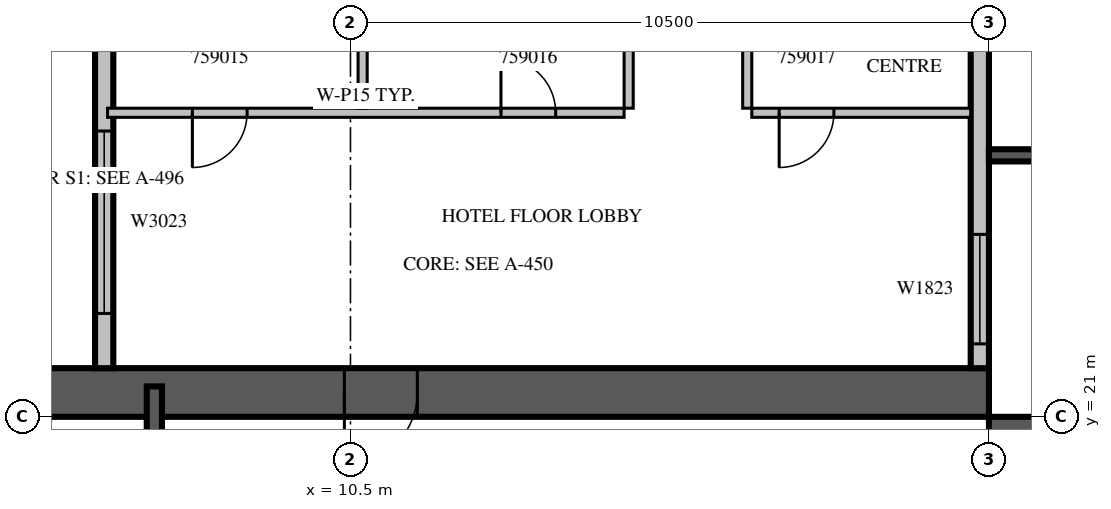
"""IFC4 building model, lengths in metres.
Left out: names, types, materials, properties, quantities, classifications, styles, units other than length and angle.
Written with IfcOpenShell. Run it as: python <this file> out.ifc"""

import sys

from ifc_helpers import new_model, si_unit, direction, frame, frame_2d, origin, place, context, subcontext, project, spatial, rectangle, extrude, source, transform, mapped, element, fill, save


model = new_model("IFC4")
c1 = context("Model", 3, precision=1e-05, world=origin(), true_north=direction((0.0, 1.0)))
c2 = subcontext(c1, "Body", "Model", "MODEL_VIEW")
j1 = project(units=[si_unit("LENGTHUNIT", "METRE"), si_unit("PLANEANGLEUNIT", "RADIAN")], contexts=[c1])
p1 = place(None, origin())
s1 = spatial("IfcSite", under=j1, at=p1, CompositionType="ELEMENT")
p2 = place(p1, origin())
s2 = spatial("IfcBuilding", under=s1, at=p2, CompositionType="ELEMENT")
p3 = place(p2, frame((0.0, 0.0, 257.6)))
s3 = spatial("IfcBuildingStorey", under=s2, at=p3, CompositionType="ELEMENT", Elevation=257.6)
m1 = source(origin(), c2, "Body", "SweptSolid", [
    extrude(rectangle(XDim=16.8, YDim=0.8, at=frame_2d((8.4, 0.0))), origin(), (0.0, 0.0, 1.0), 3.8),
])
p4 = place(p3, frame((21.4, 4.2, 0.0), z_axis=(0.0, 0.0, 1.0), x_axis=(0.0, 1.0, 0.0)))
e1 = element("IfcWall", 1, at=p4, inside=s3, PredefinedType="SHEAR", context=c2, shape_type="MappedRepresentation", body=[
    mapped(m1, transform((0.0, 0.0, 0.0), scale=1.0)),
])
m2 = source(origin(), c2, "Body", "SweptSolid", [
    extrude(rectangle(XDim=1.2, YDim=2.1, at=frame_2d((0.6, 1.05))), frame((0.0, 0.41, 0.0), z_axis=(0.0, -1.0, 0.0), x_axis=(1.0, 0.0, 0.0)), (0.0, 0.0, 1.0), 0.82),
])
p5 = place(p4, frame((14.7, 0.0, 0.0)))
e2 = element("IfcOpeningElement", 2, at=p5, cuts=e1, PredefinedType="OPENING", context=c2, shape_type="MappedRepresentation", body=[
    mapped(m2, transform((0.0, 0.0, 0.0), scale=1.0)),
])
p6 = place(p3, frame((4.2, 21.4, 0.0), z_axis=(0.0, 0.0, 1.0), x_axis=(1.0, 0.0, 0.0)))
e3 = element("IfcWall", 3, at=p6, inside=s3, PredefinedType="SHEAR", context=c2, shape_type="MappedRepresentation", body=[
    mapped(m1, transform((0.0, 0.0, 0.0), scale=1.0)),
])
p7 = place(p6, frame((6.2, 0.0, 0.0)))
e4 = element("IfcOpeningElement", 4, at=p7, cuts=e3, PredefinedType="OPENING", context=c2, shape_type="MappedRepresentation", body=[
    mapped(m2, transform((0.0, 0.0, 0.0), scale=1.0)),
])
m3 = source(origin(), c2, "Body", "SweptSolid", [
    extrude(rectangle(XDim=7.2, YDim=0.3, at=frame_2d((3.6, 0.0))), origin(), (0.0, 0.0, 1.0), 3.4),
])
p8 = place(p3, frame((20.85, 21.8, 0.0), z_axis=(0.0, 0.0, 1.0), x_axis=(0.0, 1.0, 0.0)))
e5 = element("IfcWall", 5, at=p8, inside=s3, PredefinedType="STANDARD", context=c2, shape_type="MappedRepresentation", body=[
    mapped(m3, transform((0.0, 0.0, 0.0), scale=1.0)),
])
m4 = source(origin(), c2, "Body", "SweptSolid", [
    extrude(rectangle(XDim=1.8, YDim=2.3, at=frame_2d((0.9, 1.15))), frame((0.0, 0.16, 0.0), z_axis=(0.0, -1.0, 0.0), x_axis=(1.0, 0.0, 0.0)), (0.0, 0.0, 1.0), 0.32),
])
p9 = place(p8, frame((0.4, 0.0, 0.6)))
e6 = element("IfcOpeningElement", 6, at=p9, cuts=e5, PredefinedType="OPENING", context=c2, shape_type="MappedRepresentation", body=[
    mapped(m4, transform((0.0, 0.0, 0.0), scale=1.0)),
])
m5 = source(origin(), c2, "Body", "SweptSolid", [
    extrude(rectangle(XDim=1.0, YDim=2.1, at=frame_2d((0.5, 1.05))), frame((0.0, 0.16, 0.0), z_axis=(0.0, -1.0, 0.0), x_axis=(1.0, 0.0, 0.0)), (0.0, 0.0, 1.0), 0.32),
])
p10 = place(p8, frame((5.292, 0.0, 0.0)))
e7 = element("IfcOpeningElement", 7, at=p10, cuts=e5, PredefinedType="OPENING", context=c2, shape_type="MappedRepresentation", body=[
    mapped(m5, transform((0.0, 0.0, 0.0), scale=1.0)),
])
m6 = source(origin(), c2, "Body", "SweptSolid", [
    extrude(rectangle(XDim=16.6, YDim=0.3, at=frame_2d((8.3, 0.0))), origin(), (0.0, 0.0, 1.0), 3.4),
])
p11 = place(p3, frame((6.45, 38.4, 0.0), z_axis=(0.0, 0.0, 1.0), x_axis=(0.0, -1.0, 0.0)))
e8 = element("IfcWall", 8, at=p11, inside=s3, PredefinedType="STANDARD", context=c2, shape_type="MappedRepresentation", body=[
    mapped(m6, transform((0.0, 0.0, 0.0), scale=1.0)),
])
p12 = place(p11, frame((1.15, 0.0, 0.6)))
e9 = element("IfcOpeningElement", 9, at=p12, cuts=e8, PredefinedType="OPENING", context=c2, shape_type="MappedRepresentation", body=[
    mapped(m4, transform((0.0, 0.0, 0.0), scale=1.0)),
])
p13 = place(p11, frame((9.438, 0.0, 0.6)))
e10 = element("IfcOpeningElement", 10, at=p13, cuts=e8, PredefinedType="OPENING", context=c2, shape_type="MappedRepresentation", body=[
    mapped(m4, transform((0.0, 0.0, 0.0), scale=1.0)),
])
m7 = source(origin(), c2, "Body", "SweptSolid", [
    extrude(rectangle(XDim=3.0, YDim=2.3, at=frame_2d((1.5, 1.15))), frame((0.0, 0.16, 0.0), z_axis=(0.0, -1.0, 0.0), x_axis=(1.0, 0.0, 0.0)), (0.0, 0.0, 1.0), 0.32),
])
p14 = place(p11, frame((12.7, 0.0, 0.6)))
e11 = element("IfcOpeningElement", 11, at=p14, cuts=e8, PredefinedType="OPENING", context=c2, shape_type="MappedRepresentation", body=[
    mapped(m7, transform((0.0, 0.0, 0.0), scale=1.0)),
])
p15 = place(p11, frame((5.45, 0.0, 0.0)))
e12 = element("IfcOpeningElement", 12, at=p15, cuts=e8, PredefinedType="OPENING", context=c2, shape_type="MappedRepresentation", body=[
    mapped(m5, transform((0.0, 0.0, 0.0), scale=1.0)),
])
m8 = source(origin(), c2, "Body", "SweptSolid", [
    extrude(rectangle(XDim=3.9, YDim=0.2, at=frame_2d((1.95, 0.0))), origin(), (0.0, 0.0, 1.0), 3.39),
])
p16 = place(p3, frame((21.0, 25.3, 0.0), z_axis=(0.0, 0.0, 1.0), x_axis=(1.0, 0.0, 0.0)))
e13 = element("IfcWall", 13, at=p16, inside=s3, PredefinedType="SOLIDWALL", context=c2, shape_type="MappedRepresentation", body=[
    mapped(m8, transform((0.0, 0.0, 0.0), scale=1.0)),
])
m9 = source(origin(), c2, "Body", "SweptSolid", [
    extrude(rectangle(XDim=2.4, YDim=2.3, at=frame_2d((1.2, 1.15))), frame((0.0, 0.11, 0.0), z_axis=(0.0, -1.0, 0.0), x_axis=(1.0, 0.0, 0.0)), (0.0, 0.0, 1.0), 0.22),
])
p17 = place(p16, frame((0.75, 0.0, 0.6)))
e14 = element("IfcOpeningElement", 14, at=p17, cuts=e13, PredefinedType="OPENING", context=c2, shape_type="MappedRepresentation", body=[
    mapped(m9, transform((0.0, 0.0, 0.0), scale=1.0)),
])
m10 = source(origin(), c2, "Body", "SweptSolid", [
    extrude(rectangle(XDim=6.6, YDim=0.25, at=frame_2d((3.3, 0.0))), origin(), (0.0, 0.0, 1.0), 3.4),
])
p18 = place(p3, frame((7.275, 14.9, 0.0), z_axis=(0.0, 0.0, 1.0), x_axis=(0.0, 1.0, 0.0)))
e15 = element("IfcWall", 15, at=p18, inside=s3, PredefinedType="SOLIDWALL", context=c2, shape_type="MappedRepresentation", body=[
    mapped(m10, transform((0.0, 0.0, 0.0), scale=1.0)),
])
m11 = source(origin(), c2, "Body", "SweptSolid", [
    extrude(rectangle(XDim=1.1, YDim=2.1, at=frame_2d((0.55, 1.05))), frame((0.0, 0.135, 0.0), z_axis=(0.0, -1.0, 0.0), x_axis=(1.0, 0.0, 0.0)), (0.0, 0.0, 1.0), 0.27),
])
p19 = place(p18, frame((0.15, 0.0, 0.0)))
e16 = element("IfcOpeningElement", 16, at=p19, cuts=e15, PredefinedType="OPENING", context=c2, shape_type="MappedRepresentation", body=[
    mapped(m11, transform((0.0, 0.0, 0.0), scale=1.0)),
])
m12 = source(origin(), c2, "Body", "SweptSolid", [
    extrude(rectangle(XDim=8.495, YDim=0.15, at=frame_2d((4.247, 0.0))), origin(), (0.0, 0.0, 1.0), 3.4),
])
p20 = place(p3, frame((6.505, 26.0, 0.0), z_axis=(0.0, 0.0, 1.0), x_axis=(1.0, 0.0, 0.0)))
e17 = element("IfcWall", 17, at=p20, inside=s3, PredefinedType="PARTITIONING", context=c2, shape_type="MappedRepresentation", body=[
    mapped(m12, transform((0.0, 0.0, 0.0), scale=1.0)),
])
m13 = source(origin(), c2, "Body", "SweptSolid", [
    extrude(rectangle(XDim=0.9, YDim=2.1, at=frame_2d((0.45, 1.05))), frame((0.0, 0.085, 0.0), z_axis=(0.0, -1.0, 0.0), x_axis=(1.0, 0.0, 0.0)), (0.0, 0.0, 1.0), 0.17),
])
p21 = place(p20, frame((1.395, 0.0, 0.0)))
e18 = element("IfcOpeningElement", 18, at=p21, cuts=e17, PredefinedType="OPENING", context=c2, shape_type="MappedRepresentation", body=[
    mapped(m13, transform((0.0, 0.0, 0.0), scale=1.0)),
])
p22 = place(p20, frame((6.47, 0.0, 0.0)))
e19 = element("IfcOpeningElement", 19, at=p22, cuts=e17, PredefinedType="OPENING", context=c2, shape_type="MappedRepresentation", body=[
    mapped(m13, transform((0.0, 0.0, 0.0), scale=1.0)),
])
m14 = source(origin(), c2, "Body", "SweptSolid", [
    extrude(rectangle(XDim=3.6, YDim=0.15, at=frame_2d((1.8, 0.0))), origin(), (0.0, 0.0, 1.0), 3.4),
])
p23 = place(p3, frame((17.1, 26.0, 0.0), z_axis=(0.0, 0.0, 1.0), x_axis=(1.0, 0.0, 0.0)))
e20 = element("IfcWall", 20, at=p23, inside=s3, PredefinedType="PARTITIONING", context=c2, shape_type="MappedRepresentation", body=[
    mapped(m14, transform((0.0, 0.0, 0.0), scale=1.0)),
])
p24 = place(p23, frame((0.45, 0.0, 0.0)))
e21 = element("IfcOpeningElement", 21, at=p24, cuts=e20, PredefinedType="OPENING", context=c2, shape_type="MappedRepresentation", body=[
    mapped(m13, transform((0.0, 0.0, 0.0), scale=1.0)),
])
p25 = place(p3, frame((10.7, 26.075, 0.0), z_axis=(0.0, 0.0, 1.0), x_axis=(0.0, 1.0, 0.0)))
e22 = element("IfcWall", 22, at=p25, inside=s3, PredefinedType="PARTITIONING", context=c2, shape_type="SweptSolid", body=[
    extrude(rectangle(XDim=2.926, YDim=0.15, at=frame_2d((1.463, 0.0))), origin(), (0.0, 0.0, 1.0), 3.4),
])
m15 = source(origin(), c2, "Body", "SweptSolid", [
    extrude(rectangle(XDim=3.25, YDim=0.15, at=frame_2d((1.625, 0.0))), origin(), (0.0, 0.0, 1.0), 3.4),
])
for number, where, z_axis, x_axis in (
    (23, (15.075, 26.075, 0.0), (0.0, 0.0, 1.0), (0.0, 1.0, 0.0)),
    (24, (17.025, 29.325, 0.0), (0.0, 0.0, 1.0), (0.0, -1.0, 0.0)),
):
    element("IfcWall", number, at=place(p3, frame(where, z_axis=z_axis, x_axis=x_axis)), inside=s3, PredefinedType="PARTITIONING", context=c2, shape_type="MappedRepresentation", body=[
        mapped(m15, transform((0.0, 0.0, 0.0), scale=1.0)),
    ])
m16 = source(origin(), c2, "Body", "SweptSolid", [
    extrude(rectangle(XDim=1.8, YDim=2.3, at=frame_2d((0.9, 1.15))), frame((0.0, 0.03, 0.0), z_axis=(0.0, -1.0, 0.0), x_axis=(1.0, 0.0, 0.0)), (0.0, 0.0, 1.0), 0.06),
])
p26 = place(p9, origin())
e25 = element("IfcWindow", 25, at=p26, inside=s3, PartitioningType="SINGLE_PANEL", PredefinedType="WINDOW", context=c2, shape_type="MappedRepresentation", body=[
    mapped(m16, transform((0.0, 0.0, 0.0), scale=1.0)),
])
fill(e6, e25)
m17 = source(origin(), c2, "Body", "SweptSolid", [
    extrude(rectangle(XDim=3.0, YDim=2.3, at=frame_2d((1.5, 1.15))), frame((0.0, 0.03, 0.0), z_axis=(0.0, -1.0, 0.0), x_axis=(1.0, 0.0, 0.0)), (0.0, 0.0, 1.0), 0.06),
])
p27 = place(p14, origin())
e26 = element("IfcWindow", 26, at=p27, inside=s3, PartitioningType="SINGLE_PANEL", PredefinedType="WINDOW", context=c2, shape_type="MappedRepresentation", body=[
    mapped(m17, transform((0.0, 0.0, 0.0), scale=1.0)),
])
fill(e11, e26)
m18 = source(origin(), c2, "Body", "SweptSolid", [
    extrude(rectangle(XDim=1.2, YDim=2.1, at=frame_2d((0.6, 1.05))), frame((0.0, 0.025, 0.0), z_axis=(0.0, -1.0, 0.0), x_axis=(1.0, 0.0, 0.0)), (0.0, 0.0, 1.0), 0.05),
])
p28 = place(p7, origin())
e27 = element("IfcDoor", 27, at=p28, inside=s3, OperationType="SINGLE_SWING_RIGHT", PredefinedType="DOOR", context=c2, shape_type="MappedRepresentation", body=[
    mapped(m18, transform((0.0, 0.0, 0.0), scale=1.0)),
])
fill(e4, e27)
m19 = source(origin(), c2, "Body", "SweptSolid", [
    extrude(rectangle(XDim=0.9, YDim=2.1, at=frame_2d((0.45, 1.05))), frame((0.0, 0.025, 0.0), z_axis=(0.0, -1.0, 0.0), x_axis=(1.0, 0.0, 0.0)), (0.0, 0.0, 1.0), 0.05),
])
p29 = place(p21, origin())
e28 = element("IfcDoor", 28, at=p29, inside=s3, OperationType="SINGLE_SWING_RIGHT", PredefinedType="DOOR", context=c2, shape_type="MappedRepresentation", body=[
    mapped(m19, transform((0.0, 0.0, 0.0), scale=1.0)),
])
fill(e18, e28)
p30 = place(p22, origin())
e29 = element("IfcDoor", 29, at=p30, inside=s3, OperationType="SINGLE_SWING_LEFT", PredefinedType="DOOR", context=c2, shape_type="MappedRepresentation", body=[
    mapped(m19, transform((0.0, 0.0, 0.0), scale=1.0)),
])
fill(e19, e29)
p31 = place(p24, origin())
e30 = element("IfcDoor", 30, at=p31, inside=s3, OperationType="SINGLE_SWING_RIGHT", PredefinedType="DOOR", context=c2, shape_type="MappedRepresentation", body=[
    mapped(m19, transform((0.0, 0.0, 0.0), scale=1.0)),
])
fill(e21, e30)
save(model, sys.argv[1])
